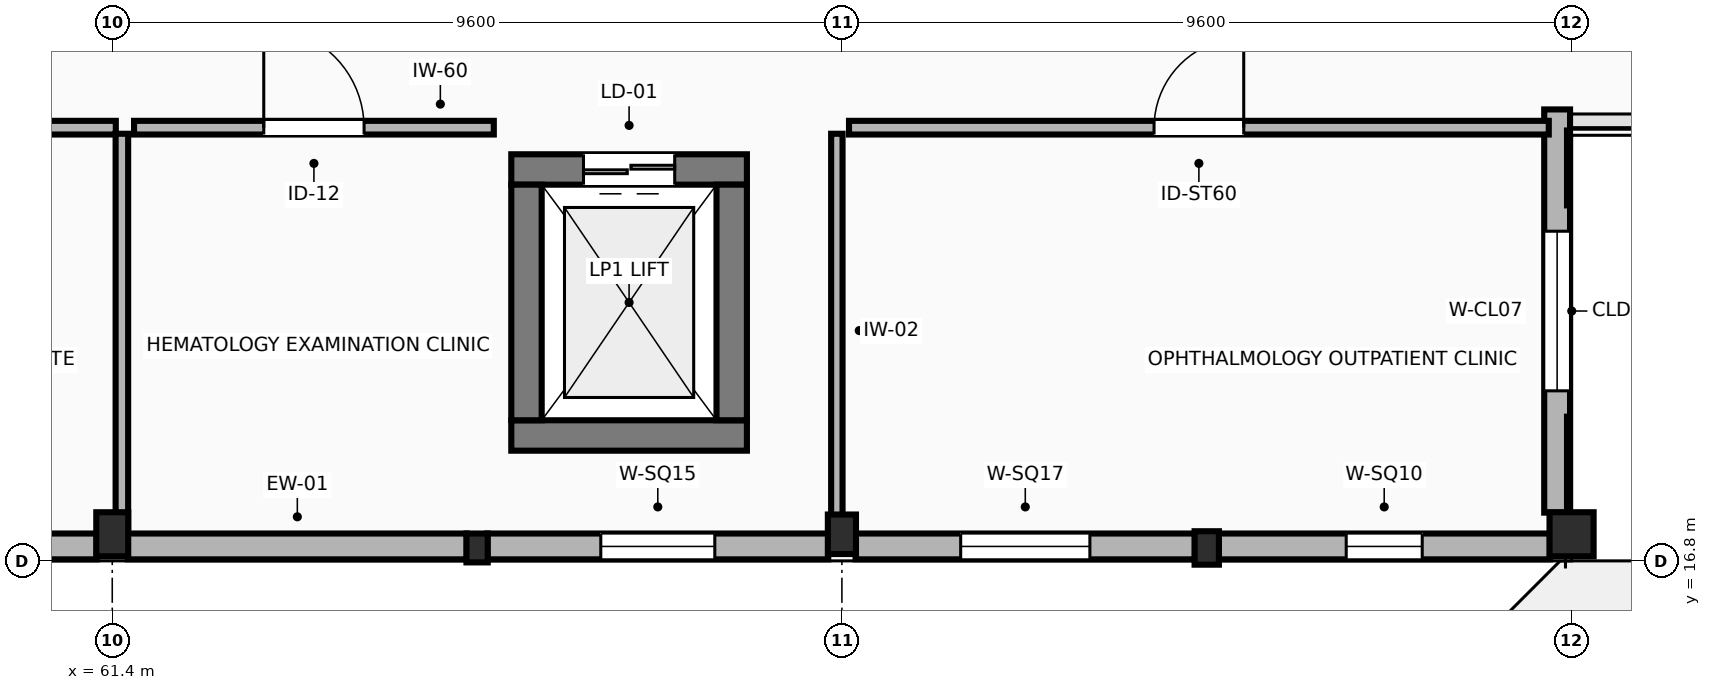
"""IFC4 building model, lengths in metres.
Left out: names, types, materials, properties, quantities, classifications, styles, units other than length and angle.
Written with IfcOpenShell. Run it as: python <this file> out.ifc"""

import sys

from ifc_helpers import new_model, si_unit, direction, frame, frame_2d, origin, origin_2d, place, context, subcontext, project, spatial, rectangle, extrude, element, fill, save


model = new_model("IFC4")
c1 = context("Model", 3, precision=1e-05, world=origin(), true_north=direction((0.0, 1.0)))
c2 = subcontext(c1, "Body", "Model", "MODEL_VIEW")
j1 = project(units=[si_unit("LENGTHUNIT", "METRE"), si_unit("PLANEANGLEUNIT", "RADIAN")], contexts=[c1])
p1 = place(None, origin())
s1 = spatial("IfcSite", under=j1, at=p1, CompositionType="ELEMENT")
p2 = place(p1, origin())
s2 = spatial("IfcBuilding", under=s1, at=p2, CompositionType="ELEMENT")
p3 = place(p2, frame((0.0, 0.0, 5.4)))
s3 = spatial("IfcBuildingStorey", under=s2, at=p3, CompositionType="ELEMENT", Elevation=5.4)
p4 = place(p3, frame((61.4, 17.15, 0.0), z_axis=(0.0, 0.0, 1.0), x_axis=(1.0, 0.0, 0.0)))
e1 = element("IfcColumn", 1, at=p4, inside=s3, PredefinedType="COLUMN", context=c2, shape_type="SweptSolid", body=[
    extrude(rectangle(XDim=0.42, YDim=0.58, at=origin_2d()), origin(), (0.0, 0.0, 1.0), 4.2),
])
p5 = place(p3, frame((71.0, 17.15, 0.0), z_axis=(0.0, 0.0, 1.0), x_axis=(1.0, 0.0, 0.0)))
e2 = element("IfcColumn", 2, at=p5, inside=s3, PredefinedType="COLUMN", context=c2, shape_type="SweptSolid", body=[
    extrude(rectangle(XDim=0.37, YDim=0.52, at=origin_2d()), origin(), (0.0, 0.0, 1.0), 4.2),
])
p6 = place(p3, frame((80.6, 17.15, 0.0), z_axis=(0.0, 0.0, 1.0), x_axis=(1.0, 0.0, 0.0)))
e3 = element("IfcColumn", 3, at=p6, inside=s3, PredefinedType="COLUMN", context=c2, shape_type="SweptSolid", body=[
    extrude(rectangle(XDim=0.58, YDim=0.58, at=origin_2d()), origin(), (0.0, 0.0, 1.0), 4.2),
])
p7 = place(p3, frame((66.2, 16.97, 0.0), z_axis=(0.0, 0.0, 1.0), x_axis=(1.0, 0.0, 0.0)))
e4 = element("IfcColumn", 4, at=p7, inside=s3, PredefinedType="PILASTER", context=c2, shape_type="SweptSolid", body=[
    extrude(rectangle(XDim=0.28, YDim=0.38, at=origin_2d()), origin(), (0.0, 0.0, 1.0), 4.2),
])
p8 = place(p3, frame((75.8, 16.97, 0.0), z_axis=(0.0, 0.0, 1.0), x_axis=(1.0, 0.0, 0.0)))
e5 = element("IfcColumn", 5, at=p8, inside=s3, PredefinedType="PILASTER", context=c2, shape_type="SweptSolid", body=[
    extrude(rectangle(XDim=0.32, YDim=0.44, at=origin_2d()), origin(), (0.0, 0.0, 1.0), 4.2),
])
p9 = place(p3, frame((56.755, 16.99, 0.0), z_axis=(0.0, 0.0, 1.0), x_axis=(1.0, 0.0, 0.0)))
e6 = element("IfcWall", 6, at=p9, inside=s3, PredefinedType="STANDARD", context=c2, shape_type="SweptSolid", body=[
    extrude(rectangle(XDim=4.44, YDim=0.34, at=frame_2d((2.22, 0.0))), origin(), (0.0, 0.0, 1.0), 3.215),
])
p10 = place(p3, frame((61.605, 16.99, 0.0), z_axis=(0.0, 0.0, 1.0), x_axis=(1.0, 0.0, 0.0)))
e7 = element("IfcWall", 7, at=p10, inside=s3, PredefinedType="STANDARD", context=c2, shape_type="SweptSolid", body=[
    extrude(rectangle(XDim=4.46, YDim=0.34, at=frame_2d((2.23, 0.0))), origin(), (0.0, 0.0, 1.0), 3.185),
])
p11 = place(p3, frame((66.335, 16.99, 0.0), z_axis=(0.0, 0.0, 1.0), x_axis=(1.0, 0.0, 0.0)))
e8 = element("IfcWall", 8, at=p11, inside=s3, PredefinedType="STANDARD", context=c2, shape_type="SweptSolid", body=[
    extrude(rectangle(XDim=4.485, YDim=0.34, at=frame_2d((2.243, 0.0))), origin(), (0.0, 0.0, 1.0), 3.185),
])
p12 = place(p11, frame((1.492, 0.0, 0.95)))
e9 = element("IfcOpeningElement", 9, at=p12, cuts=e8, PredefinedType="OPENING", context=c2, shape_type="SweptSolid", body=[
    extrude(rectangle(XDim=1.5, YDim=1.5, at=frame_2d((0.75, 0.75))), frame((0.0, 0.18, 0.0), z_axis=(0.0, -1.0, 0.0), x_axis=(1.0, 0.0, 0.0)), (0.0, 0.0, 1.0), 0.36),
])
p13 = place(p3, frame((71.18, 16.99, 0.0), z_axis=(0.0, 0.0, 1.0), x_axis=(1.0, 0.0, 0.0)))
e10 = element("IfcWall", 10, at=p13, inside=s3, PredefinedType="STANDARD", context=c2, shape_type="SweptSolid", body=[
    extrude(rectangle(XDim=4.465, YDim=0.34, at=frame_2d((2.232, 0.0))), origin(), (0.0, 0.0, 1.0), 3.185),
])
p14 = place(p13, frame((1.383, 0.0, 1.15)))
e11 = element("IfcOpeningElement", 11, at=p14, cuts=e10, PredefinedType="OPENING", context=c2, shape_type="SweptSolid", body=[
    extrude(rectangle(XDim=1.7, YDim=1.7, at=frame_2d((0.85, 0.85))), frame((0.0, 0.18, 0.0), z_axis=(0.0, -1.0, 0.0), x_axis=(1.0, 0.0, 0.0)), (0.0, 0.0, 1.0), 0.36),
])
p15 = place(p3, frame((75.955, 16.99, 0.0), z_axis=(0.0, 0.0, 1.0), x_axis=(1.0, 0.0, 0.0)))
e12 = element("IfcWall", 12, at=p15, inside=s3, PredefinedType="STANDARD", context=c2, shape_type="SweptSolid", body=[
    extrude(rectangle(XDim=4.36, YDim=0.34, at=frame_2d((2.18, 0.0))), origin(), (0.0, 0.0, 1.0), 3.185),
])
p16 = place(p15, frame((1.68, 0.0, 1.15)))
e13 = element("IfcOpeningElement", 13, at=p16, cuts=e12, PredefinedType="OPENING", context=c2, shape_type="SweptSolid", body=[
    extrude(rectangle(XDim=1.0, YDim=1.0, at=frame_2d((0.5, 0.5))), frame((0.0, 0.18, 0.0), z_axis=(0.0, -1.0, 0.0), x_axis=(1.0, 0.0, 0.0)), (0.0, 0.0, 1.0), 0.36),
])
p17 = place(p3, frame((80.41, 17.435, 0.0), z_axis=(0.0, 0.0, 1.0), x_axis=(0.0, 1.0, 0.0)))
e14 = element("IfcWall", 14, at=p17, inside=s3, PredefinedType="STANDARD", context=c2, shape_type="SweptSolid", body=[
    extrude(rectangle(XDim=5.305, YDim=0.34, at=frame_2d((2.652, 0.0))), origin(), (0.0, 0.0, 1.0), 3.335),
])
p18 = place(p17, frame((1.603, 0.0, 0.95)))
e15 = element("IfcOpeningElement", 15, at=p18, cuts=e14, PredefinedType="OPENING", context=c2, shape_type="SweptSolid", body=[
    extrude(rectangle(XDim=2.1, YDim=1.8, at=frame_2d((1.05, 0.9))), frame((0.0, 0.18, 0.0), z_axis=(0.0, -1.0, 0.0), x_axis=(1.0, 0.0, 0.0)), (0.0, 0.0, 1.0), 0.36),
])
p19 = place(p3, frame((66.65, 18.45, 0.0), z_axis=(0.0, 0.0, 1.0), x_axis=(1.0, 0.0, 0.0)))
e16 = element("IfcWall", 16, at=p19, inside=s3, PredefinedType="SHEAR", context=c2, shape_type="SweptSolid", body=[
    extrude(rectangle(XDim=3.1, YDim=0.4, at=frame_2d((1.55, 0.0))), origin(), (0.0, 0.0, 1.0), 4.2),
])
p20 = place(p3, frame((69.75, 21.95, 0.0), z_axis=(0.0, 0.0, 1.0), x_axis=(-1.0, 0.0, 0.0)))
e17 = element("IfcWall", 17, at=p20, inside=s3, PredefinedType="SHEAR", context=c2, shape_type="SweptSolid", body=[
    extrude(rectangle(XDim=3.1, YDim=0.4, at=frame_2d((1.55, 0.0))), origin(), (0.0, 0.0, 1.0), 4.2),
])
p21 = place(p20, frame((0.95, 0.0, 0.0)))
e18 = element("IfcOpeningElement", 18, at=p21, cuts=e17, PredefinedType="OPENING", context=c2, shape_type="SweptSolid", body=[
    extrude(rectangle(XDim=1.2, YDim=2.2, at=frame_2d((0.6, 1.1))), frame((0.0, 0.21, 0.0), z_axis=(0.0, -1.0, 0.0), x_axis=(1.0, 0.0, 0.0)), (0.0, 0.0, 1.0), 0.42),
])
for number, where, z_axis, x_axis in (
    (19, (66.85, 18.65, 0.0), (0.0, 0.0, 1.0), (0.0, 1.0, 0.0)),
    (20, (69.55, 21.75, 0.0), (0.0, 0.0, 1.0), (0.0, -1.0, 0.0)),
):
    element("IfcWall", number, at=place(p3, frame(where, z_axis=z_axis, x_axis=x_axis)), inside=s3, PredefinedType="SHEAR", context=c2, shape_type="SweptSolid", body=[
        extrude(rectangle(XDim=3.1, YDim=0.4, at=frame_2d((1.55, 0.0))), origin(), (0.0, 0.0, 1.0), 4.2),
    ])
p22 = place(p3, frame((52.365, 22.5, 0.0), z_axis=(0.0, 0.0, 1.0), x_axis=(1.0, 0.0, 0.0)))
e21 = element("IfcWall", 21, at=p22, inside=s3, PredefinedType="PARTITIONING", context=c2, shape_type="SweptSolid", body=[
    extrude(rectangle(XDim=9.082, YDim=0.18, at=frame_2d((4.541, 0.0))), origin(), (0.0, 0.0, 1.0), 3.92),
])
p23 = place(p22, frame((3.981, 0.0, 0.0)))
e22 = element("IfcOpeningElement", 22, at=p23, cuts=e21, PredefinedType="OPENING", context=c2, shape_type="SweptSolid", body=[
    extrude(rectangle(XDim=1.12, YDim=2.16, at=frame_2d((0.56, 1.08))), frame((0.0, 0.1, 0.0), z_axis=(0.0, -1.0, 0.0), x_axis=(1.0, 0.0, 0.0)), (0.0, 0.0, 1.0), 0.2),
])
p24 = place(p3, frame((61.527, 22.42, 0.0), z_axis=(0.0, 0.0, 1.0), x_axis=(0.0, -1.0, 0.0)))
e23 = element("IfcWall", 23, at=p24, inside=s3, PredefinedType="PARTITIONING", context=c2, shape_type="SweptSolid", body=[
    extrude(rectangle(XDim=5.18, YDim=0.165, at=frame_2d((2.59, 0.0))), origin(), (0.0, 0.0, 1.0), 3.405),
])
p25 = place(p3, frame((61.687, 22.5, 0.0), z_axis=(0.0, 0.0, 1.0), x_axis=(1.0, 0.0, 0.0)))
e24 = element("IfcWall", 24, at=p25, inside=s3, PredefinedType="PARTITIONING", context=c2, shape_type="SweptSolid", body=[
    extrude(rectangle(XDim=4.733, YDim=0.18, at=frame_2d((2.367, 0.0))), origin(), (0.0, 0.0, 1.0), 3.92),
])
p26 = place(p25, frame((1.707, 0.0, 0.0)))
e25 = element("IfcOpeningElement", 25, at=p26, cuts=e24, PredefinedType="OPENING", context=c2, shape_type="SweptSolid", body=[
    extrude(rectangle(XDim=1.32, YDim=2.22, at=frame_2d((0.66, 1.11))), frame((0.0, 0.1, 0.0), z_axis=(0.0, -1.0, 0.0), x_axis=(1.0, 0.0, 0.0)), (0.0, 0.0, 1.0), 0.2),
])
p27 = place(p3, frame((70.933, 22.42, 0.0), z_axis=(0.0, 0.0, 1.0), x_axis=(0.0, -1.0, 0.0)))
e26 = element("IfcWall", 26, at=p27, inside=s3, PredefinedType="PARTITIONING", context=c2, shape_type="SweptSolid", body=[
    extrude(rectangle(XDim=5.18, YDim=0.15, at=frame_2d((2.59, 0.0))), origin(), (0.0, 0.0, 1.0), 3.405),
])
p28 = place(p3, frame((71.093, 22.5, 0.0), z_axis=(0.0, 0.0, 1.0), x_axis=(1.0, 0.0, 0.0)))
e27 = element("IfcWall", 27, at=p28, inside=s3, PredefinedType="PARTITIONING", context=c2, shape_type="SweptSolid", body=[
    extrude(rectangle(XDim=9.207, YDim=0.18, at=frame_2d((4.604, 0.0))), origin(), (0.0, 0.0, 1.0), 3.92),
])
p29 = place(p28, frame((4.013, 0.0, 0.0)))
e28 = element("IfcOpeningElement", 28, at=p29, cuts=e27, PredefinedType="OPENING", context=c2, shape_type="SweptSolid", body=[
    extrude(rectangle(XDim=1.18, YDim=2.18, at=frame_2d((0.59, 1.09))), frame((0.0, 0.1, 0.0), z_axis=(0.0, -1.0, 0.0), x_axis=(1.0, 0.0, 0.0)), (0.0, 0.0, 1.0), 0.2),
])
p30 = place(p12, origin())
e29 = element("IfcWindow", 29, at=p30, inside=s3, PartitioningType="SINGLE_PANEL", PredefinedType="WINDOW", context=c2, shape_type="SweptSolid", body=[
    extrude(rectangle(XDim=1.5, YDim=1.5, at=frame_2d((0.75, 0.75))), frame((0.0, 0.03, 0.0), z_axis=(0.0, -1.0, 0.0), x_axis=(1.0, 0.0, 0.0)), (0.0, 0.0, 1.0), 0.06),
])
fill(e9, e29)
p31 = place(p14, origin())
e30 = element("IfcWindow", 30, at=p31, inside=s3, PartitioningType="SINGLE_PANEL", PredefinedType="WINDOW", context=c2, shape_type="SweptSolid", body=[
    extrude(rectangle(XDim=1.7, YDim=1.7, at=frame_2d((0.85, 0.85))), frame((0.0, 0.03, 0.0), z_axis=(0.0, -1.0, 0.0), x_axis=(1.0, 0.0, 0.0)), (0.0, 0.0, 1.0), 0.06),
])
fill(e11, e30)
p32 = place(p16, origin())
e31 = element("IfcWindow", 31, at=p32, inside=s3, PartitioningType="SINGLE_PANEL", PredefinedType="WINDOW", context=c2, shape_type="SweptSolid", body=[
    extrude(rectangle(XDim=1.0, YDim=1.0, at=frame_2d((0.5, 0.5))), frame((0.0, 0.03, 0.0), z_axis=(0.0, -1.0, 0.0), x_axis=(1.0, 0.0, 0.0)), (0.0, 0.0, 1.0), 0.06),
])
fill(e13, e31)
p33 = place(p18, origin())
e32 = element("IfcWindow", 32, at=p33, inside=s3, PartitioningType="SINGLE_PANEL", PredefinedType="WINDOW", context=c2, shape_type="SweptSolid", body=[
    extrude(rectangle(XDim=2.1, YDim=1.8, at=frame_2d((1.05, 0.9))), frame((0.0, 0.03, 0.0), z_axis=(0.0, -1.0, 0.0), x_axis=(1.0, 0.0, 0.0)), (0.0, 0.0, 1.0), 0.06),
])
fill(e15, e32)
p34 = place(p21, origin())
e33 = element("IfcDoor", 33, at=p34, inside=s3, OperationType="DOUBLE_DOOR_SLIDING", PredefinedType="DOOR", context=c2, shape_type="SweptSolid", body=[
    extrude(rectangle(XDim=1.2, YDim=2.2, at=frame_2d((0.6, 1.1))), frame((0.0, 0.025, 0.0), z_axis=(0.0, -1.0, 0.0), x_axis=(1.0, 0.0, 0.0)), (0.0, 0.0, 1.0), 0.05),
])
fill(e18, e33)
p35 = place(p26, origin())
e34 = element("IfcDoor", 34, at=p35, inside=s3, OperationType="SINGLE_SWING_LEFT", PredefinedType="DOOR", context=c2, shape_type="SweptSolid", body=[
    extrude(rectangle(XDim=1.32, YDim=2.22, at=frame_2d((0.66, 1.11))), frame((0.0, 0.025, 0.0), z_axis=(0.0, -1.0, 0.0), x_axis=(1.0, 0.0, 0.0)), (0.0, 0.0, 1.0), 0.05),
])
fill(e25, e34)
p36 = place(p29, origin())
e35 = element("IfcDoor", 35, at=p36, inside=s3, OperationType="SINGLE_SWING_RIGHT", PredefinedType="DOOR", context=c2, shape_type="SweptSolid", body=[
    extrude(rectangle(XDim=1.18, YDim=2.18, at=frame_2d((0.59, 1.09))), frame((0.0, 0.025, 0.0), z_axis=(0.0, -1.0, 0.0), x_axis=(1.0, 0.0, 0.0)), (0.0, 0.0, 1.0), 0.05),
])
fill(e28, e35)
save(model, sys.argv[1])
